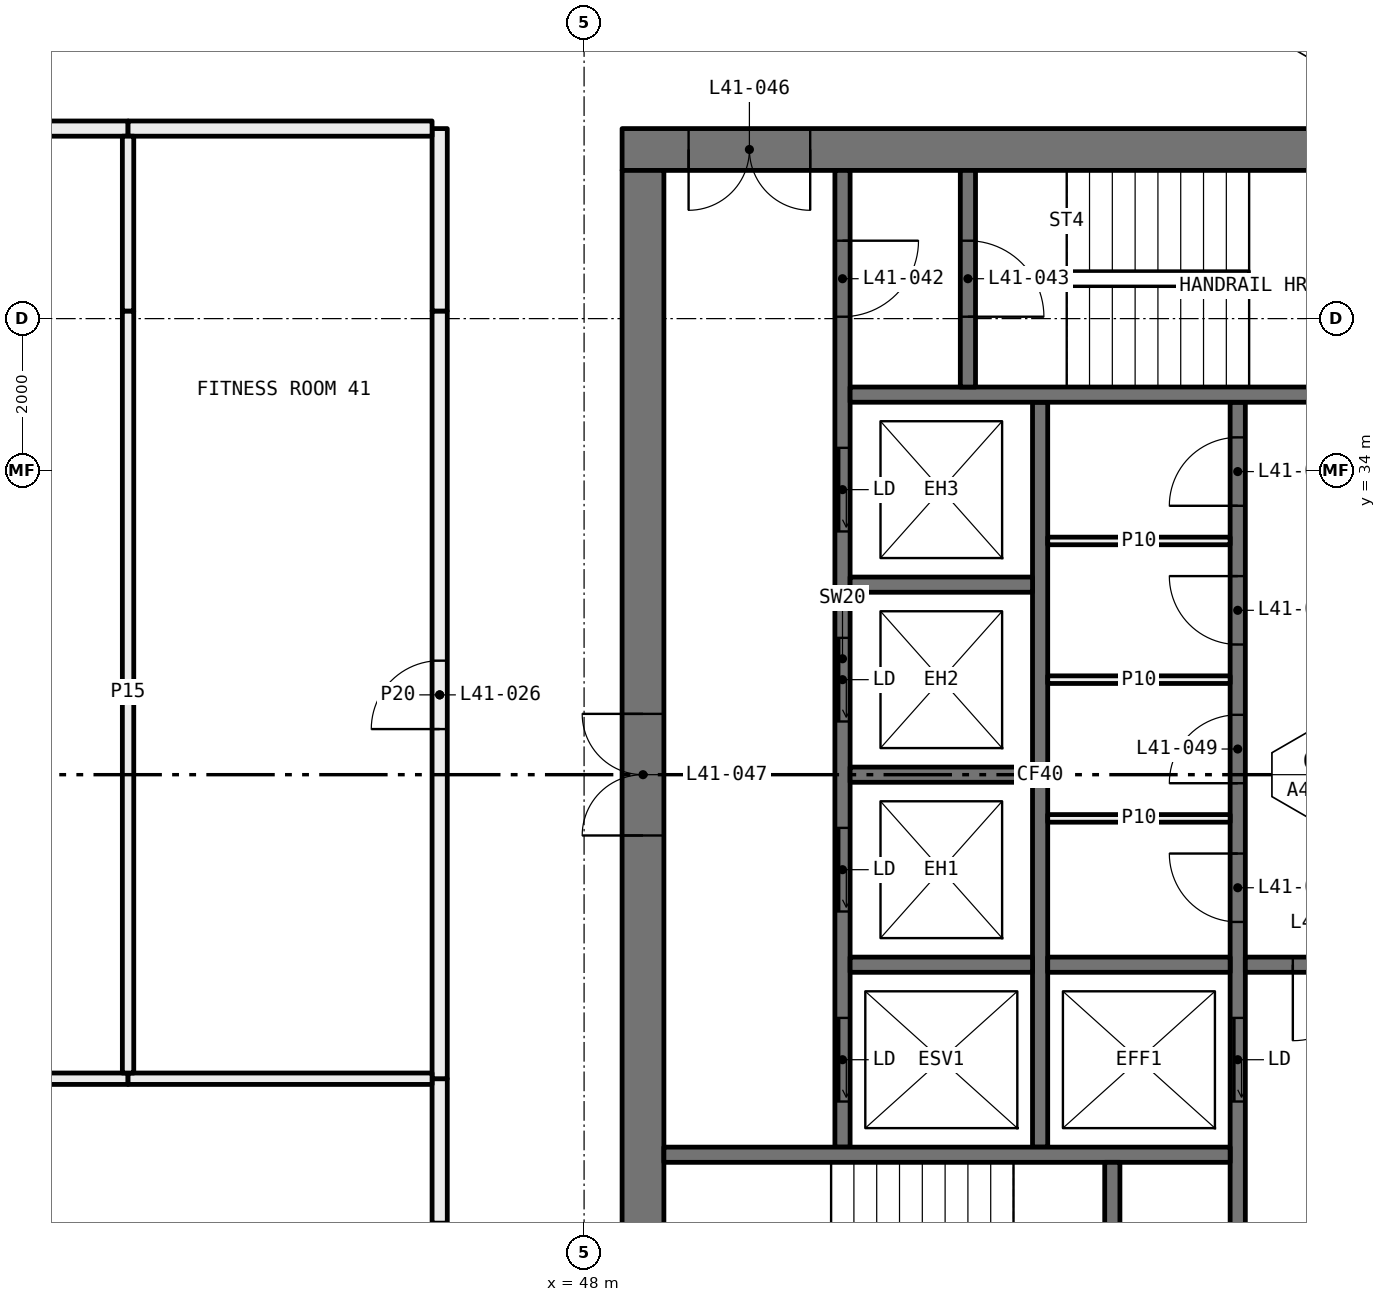
"""IFC4 building model, lengths in metres.
Left out: names, types, materials, properties, quantities, classifications, styles, units other than length and angle.
Written with IfcOpenShell. Run it as: python <this file> out.ifc"""

import sys

from ifc_helpers import new_model, si_unit, direction, frame, frame_2d, origin, place, context, subcontext, project, spatial, rectangle, extrude, element, fill, save


model = new_model("IFC4")
c1 = context("Model", 3, precision=1e-05, world=origin(), true_north=direction((0.0, 1.0)))
c2 = subcontext(c1, "Body", "Model", "MODEL_VIEW")
j1 = project(units=[si_unit("LENGTHUNIT", "METRE"), si_unit("PLANEANGLEUNIT", "RADIAN")], contexts=[c1])
p1 = place(None, origin())
s1 = spatial("IfcSite", under=j1, at=p1, CompositionType="ELEMENT")
p2 = place(p1, origin())
s2 = spatial("IfcBuilding", under=s1, at=p2, CompositionType="ELEMENT")
p3 = place(p2, frame((0.0, 0.0, 158.25)))
s3 = spatial("IfcBuildingStorey", under=s2, at=p3, CompositionType="ELEMENT", Elevation=158.25)
p4 = place(p3, frame((46.1, 24.1, 0.0), z_axis=(0.0, 0.0, 1.0), x_axis=(0.0, 1.0, 0.0)))
e1 = element("IfcWall", 1, at=p4, inside=s3, PredefinedType="PARTITIONING", context=c2, shape_type="SweptSolid", body=[
    extrude(rectangle(XDim=1.9, YDim=0.2, at=frame_2d((0.95, 0.0))), origin(), (0.0, 0.0, 1.0), 3.05),
])
p5 = place(p3, frame((42.0, 38.5, 0.0), z_axis=(0.0, 0.0, 1.0), x_axis=(-1.0, 0.0, 0.0)))
e2 = element("IfcWall", 2, at=p5, inside=s3, PredefinedType="PARTITIONING", context=c2, shape_type="SweptSolid", body=[
    extrude(rectangle(XDim=6.1, YDim=0.2, at=frame_2d((3.05, 0.0))), origin(), (0.0, 0.0, 1.0), 2.45),
])
p6 = place(p3, frame((46.1, 26.0, 0.0), z_axis=(0.0, 0.0, 1.0), x_axis=(0.0, 1.0, 0.0)))
e3 = element("IfcWall", 3, at=p6, inside=s3, PredefinedType="PARTITIONING", context=c2, shape_type="SweptSolid", body=[
    extrude(rectangle(XDim=10.1, YDim=0.2, at=frame_2d((5.05, 0.0))), origin(), (0.0, 0.0, 1.0), 2.45),
])
p7 = place(p6, frame((4.6, 0.0, 0.0)))
e4 = element("IfcOpeningElement", 4, at=p7, cuts=e3, PredefinedType="OPENING", context=c2, shape_type="SweptSolid", body=[
    extrude(rectangle(XDim=0.9, YDim=2.1, at=frame_2d((0.45, 1.05))), frame((0.0, 0.11, 0.0), z_axis=(0.0, -1.0, 0.0), x_axis=(1.0, 0.0, 0.0)), (0.0, 0.0, 1.0), 0.22),
])
p8 = place(p3, frame((46.1, 36.1, 0.0), z_axis=(0.0, 0.0, 1.0), x_axis=(0.0, 1.0, 0.0)))
e5 = element("IfcWall", 5, at=p8, inside=s3, PredefinedType="PARTITIONING", context=c2, shape_type="SweptSolid", body=[
    extrude(rectangle(XDim=2.4, YDim=0.2, at=frame_2d((1.2, 0.0))), origin(), (0.0, 0.0, 1.0), 3.05),
])
p9 = place(p3, frame((46.0, 38.5, 0.0), z_axis=(0.0, 0.0, 1.0), x_axis=(-1.0, 0.0, 0.0)))
e6 = element("IfcWall", 6, at=p9, inside=s3, PredefinedType="PARTITIONING", context=c2, shape_type="SweptSolid", body=[
    extrude(rectangle(XDim=4.0, YDim=0.2, at=frame_2d((2.0, 0.0))), origin(), (0.0, 0.0, 1.0), 3.05),
])
p10 = place(p3, frame((42.0, 26.0, 0.0), z_axis=(0.0, 0.0, 1.0), x_axis=(-1.0, 0.0, 0.0)))
e7 = element("IfcWall", 7, at=p10, inside=s3, PredefinedType="PARTITIONING", context=c2, shape_type="SweptSolid", body=[
    extrude(rectangle(XDim=5.925, YDim=0.15, at=frame_2d((2.962, 0.0))), origin(), (0.0, 0.0, 1.0), 2.45),
])
p11 = place(p3, frame((46.0, 26.0, 0.0), z_axis=(0.0, 0.0, 1.0), x_axis=(-1.0, 0.0, 0.0)))
e8 = element("IfcWall", 8, at=p11, inside=s3, PredefinedType="PARTITIONING", context=c2, shape_type="SweptSolid", body=[
    extrude(rectangle(XDim=4.0, YDim=0.15, at=frame_2d((2.0, 0.0))), origin(), (0.0, 0.0, 1.0), 3.05),
])
p12 = place(p3, frame((42.0, 26.075, 0.0), z_axis=(0.0, 0.0, 1.0), x_axis=(0.0, 1.0, 0.0)))
e9 = element("IfcWall", 9, at=p12, inside=s3, PredefinedType="PARTITIONING", context=c2, shape_type="SweptSolid", body=[
    extrude(rectangle(XDim=10.025, YDim=0.15, at=frame_2d((5.013, 0.0))), origin(), (0.0, 0.0, 1.0), 2.45),
])
p13 = place(p3, frame((42.0, 36.1, 0.0), z_axis=(0.0, 0.0, 1.0), x_axis=(0.0, 1.0, 0.0)))
e10 = element("IfcWall", 10, at=p13, inside=s3, PredefinedType="PARTITIONING", context=c2, shape_type="SweptSolid", body=[
    extrude(rectangle(XDim=2.3, YDim=0.15, at=frame_2d((1.15, 0.0))), origin(), (0.0, 0.0, 1.0), 3.05),
])
p14 = place(p3, frame((59.5, 38.225, 0.0), z_axis=(0.0, 0.0, 1.0), x_axis=(-1.0, 0.0, 0.0)))
e11 = element("IfcWall", 11, at=p14, inside=s3, PredefinedType="SHEAR", context=c2, shape_type="SweptSolid", body=[
    extrude(rectangle(XDim=11.0, YDim=0.55, at=frame_2d((5.5, 0.0))), origin(), (0.0, 0.0, 1.0), 3.05),
])
p15 = place(p14, frame((8.525, 0.0, 0.0)))
e12 = element("IfcOpeningElement", 12, at=p15, cuts=e11, PredefinedType="OPENING", context=c2, shape_type="SweptSolid", body=[
    extrude(rectangle(XDim=1.6, YDim=2.1, at=frame_2d((0.8, 1.05))), frame((0.0, 0.285, 0.0), z_axis=(0.0, -1.0, 0.0), x_axis=(1.0, 0.0, 0.0)), (0.0, 0.0, 1.0), 0.57),
])
p16 = place(p3, frame((48.775, 22.05, 0.0), z_axis=(0.0, 0.0, 1.0), x_axis=(0.0, 1.0, 0.0)))
e13 = element("IfcWall", 13, at=p16, inside=s3, PredefinedType="SHEAR", context=c2, shape_type="SweptSolid", body=[
    extrude(rectangle(XDim=15.9, YDim=0.55, at=frame_2d((7.95, 0.0))), origin(), (0.0, 0.0, 1.0), 3.05),
])
p17 = place(p16, frame((7.15, 0.0, 0.0)))
e14 = element("IfcOpeningElement", 14, at=p17, cuts=e13, PredefinedType="OPENING", context=c2, shape_type="SweptSolid", body=[
    extrude(rectangle(XDim=1.6, YDim=2.1, at=frame_2d((0.8, 1.05))), frame((0.0, 0.285, 0.0), z_axis=(0.0, -1.0, 0.0), x_axis=(1.0, 0.0, 0.0)), (0.0, 0.0, 1.0), 0.57),
])
p18 = place(p3, frame((56.6, 22.05, 0.0), z_axis=(0.0, 0.0, 1.0), x_axis=(0.0, 1.0, 0.0)))
e15 = element("IfcWall", 15, at=p18, inside=s3, PredefinedType="SOLIDWALL", context=c2, shape_type="SweptSolid", body=[
    extrude(rectangle(XDim=12.85, YDim=0.2, at=frame_2d((6.425, 0.0))), origin(), (0.0, 0.0, 1.0), 3.05),
])
p19 = place(p18, frame((3.65, 0.0, 0.0)))
e16 = element("IfcOpeningElement", 16, at=p19, cuts=e15, PredefinedType="OPENING", context=c2, shape_type="SweptSolid", body=[
    extrude(rectangle(XDim=1.1, YDim=2.1, at=frame_2d((0.55, 1.05))), frame((0.0, 0.11, 0.0), z_axis=(0.0, -1.0, 0.0), x_axis=(1.0, 0.0, 0.0)), (0.0, 0.0, 1.0), 0.22),
])
p20 = place(p18, frame((0.15, 0.0, 0.0)))
e17 = element("IfcOpeningElement", 17, at=p20, cuts=e15, PredefinedType="OPENING", context=c2, shape_type="SweptSolid", body=[
    extrude(rectangle(XDim=1.0, YDim=2.1, at=frame_2d((0.5, 1.05))), frame((0.0, 0.11, 0.0), z_axis=(0.0, -1.0, 0.0), x_axis=(1.0, 0.0, 0.0)), (0.0, 0.0, 1.0), 0.22),
])
p21 = place(p18, frame((6.012, 0.0, 0.0)))
e18 = element("IfcOpeningElement", 18, at=p21, cuts=e15, PredefinedType="OPENING", context=c2, shape_type="SweptSolid", body=[
    extrude(rectangle(XDim=0.9, YDim=2.1, at=frame_2d((0.45, 1.05))), frame((0.0, 0.11, 0.0), z_axis=(0.0, -1.0, 0.0), x_axis=(1.0, 0.0, 0.0)), (0.0, 0.0, 1.0), 0.22),
])
p22 = place(p18, frame((7.837, 0.0, 0.0)))
e19 = element("IfcOpeningElement", 19, at=p22, cuts=e15, PredefinedType="OPENING", context=c2, shape_type="SweptSolid", body=[
    extrude(rectangle(XDim=0.9, YDim=2.1, at=frame_2d((0.45, 1.05))), frame((0.0, 0.11, 0.0), z_axis=(0.0, -1.0, 0.0), x_axis=(1.0, 0.0, 0.0)), (0.0, 0.0, 1.0), 0.22),
])
p23 = place(p18, frame((9.663, 0.0, 0.0)))
e20 = element("IfcOpeningElement", 20, at=p23, cuts=e15, PredefinedType="OPENING", context=c2, shape_type="SweptSolid", body=[
    extrude(rectangle(XDim=0.9, YDim=2.1, at=frame_2d((0.45, 1.05))), frame((0.0, 0.11, 0.0), z_axis=(0.0, -1.0, 0.0), x_axis=(1.0, 0.0, 0.0)), (0.0, 0.0, 1.0), 0.22),
])
p24 = place(p18, frame((11.488, 0.0, 0.0)))
e21 = element("IfcOpeningElement", 21, at=p24, cuts=e15, PredefinedType="OPENING", context=c2, shape_type="SweptSolid", body=[
    extrude(rectangle(XDim=0.9, YDim=2.1, at=frame_2d((0.45, 1.05))), frame((0.0, 0.11, 0.0), z_axis=(0.0, -1.0, 0.0), x_axis=(1.0, 0.0, 0.0)), (0.0, 0.0, 1.0), 0.22),
])
p25 = place(p3, frame((51.4, 25.1, 0.0), z_axis=(0.0, 0.0, 1.0), x_axis=(0.0, 1.0, 0.0)))
e22 = element("IfcWall", 22, at=p25, inside=s3, PredefinedType="SOLIDWALL", context=c2, shape_type="SweptSolid", body=[
    extrude(rectangle(XDim=12.85, YDim=0.2, at=frame_2d((6.425, 0.0))), origin(), (0.0, 0.0, 1.0), 3.05),
])
p26 = place(p25, frame((0.6, 0.0, 0.0)))
e23 = element("IfcOpeningElement", 23, at=p26, cuts=e22, PredefinedType="OPENING", context=c2, shape_type="SweptSolid", body=[
    extrude(rectangle(XDim=1.1, YDim=2.1, at=frame_2d((0.55, 1.05))), frame((0.0, 0.11, 0.0), z_axis=(0.0, -1.0, 0.0), x_axis=(1.0, 0.0, 0.0)), (0.0, 0.0, 1.0), 0.22),
])
p27 = place(p25, frame((3.1, 0.0, 0.0)))
e24 = element("IfcOpeningElement", 24, at=p27, cuts=e22, PredefinedType="OPENING", context=c2, shape_type="SweptSolid", body=[
    extrude(rectangle(XDim=1.1, YDim=2.1, at=frame_2d((0.55, 1.05))), frame((0.0, 0.11, 0.0), z_axis=(0.0, -1.0, 0.0), x_axis=(1.0, 0.0, 0.0)), (0.0, 0.0, 1.0), 0.22),
])
p28 = place(p25, frame((5.6, 0.0, 0.0)))
e25 = element("IfcOpeningElement", 25, at=p28, cuts=e22, PredefinedType="OPENING", context=c2, shape_type="SweptSolid", body=[
    extrude(rectangle(XDim=1.1, YDim=2.1, at=frame_2d((0.55, 1.05))), frame((0.0, 0.11, 0.0), z_axis=(0.0, -1.0, 0.0), x_axis=(1.0, 0.0, 0.0)), (0.0, 0.0, 1.0), 0.22),
])
p29 = place(p25, frame((8.1, 0.0, 0.0)))
e26 = element("IfcOpeningElement", 26, at=p29, cuts=e22, PredefinedType="OPENING", context=c2, shape_type="SweptSolid", body=[
    extrude(rectangle(XDim=1.1, YDim=2.1, at=frame_2d((0.55, 1.05))), frame((0.0, 0.11, 0.0), z_axis=(0.0, -1.0, 0.0), x_axis=(1.0, 0.0, 0.0)), (0.0, 0.0, 1.0), 0.22),
])
p30 = place(p25, frame((10.925, 0.0, 0.0)))
e27 = element("IfcOpeningElement", 27, at=p30, cuts=e22, PredefinedType="OPENING", context=c2, shape_type="SweptSolid", body=[
    extrude(rectangle(XDim=1.0, YDim=2.1, at=frame_2d((0.5, 1.05))), frame((0.0, 0.11, 0.0), z_axis=(0.0, -1.0, 0.0), x_axis=(1.0, 0.0, 0.0)), (0.0, 0.0, 1.0), 0.22),
])
p31 = place(p3, frame((54.0, 25.1, 0.0), z_axis=(0.0, 0.0, 1.0), x_axis=(0.0, 1.0, 0.0)))
e28 = element("IfcWall", 28, at=p31, inside=s3, PredefinedType="SOLIDWALL", context=c2, shape_type="SweptSolid", body=[
    extrude(rectangle(XDim=9.8, YDim=0.2, at=frame_2d((4.9, 0.0))), origin(), (0.0, 0.0, 1.0), 3.05),
])
for number, where, z_axis, x_axis in (
    (29, (56.5, 25.0, 0.0), (0.0, 0.0, 1.0), (-1.0, 0.0, 0.0)),
    (30, (58.95, 35.0, 0.0), (0.0, 0.0, 1.0), (-1.0, 0.0, 0.0)),
):
    element("IfcWall", number, at=place(p3, frame(where, z_axis=z_axis, x_axis=x_axis)), inside=s3, PredefinedType="SOLIDWALL", context=c2, shape_type="SweptSolid", body=[
        extrude(rectangle(XDim=7.45, YDim=0.2, at=frame_2d((3.725, 0.0))), origin(), (0.0, 0.0, 1.0), 3.05),
    ])
p32 = place(p3, frame((58.95, 27.5, 0.0), z_axis=(0.0, 0.0, 1.0), x_axis=(-1.0, 0.0, 0.0)))
e31 = element("IfcWall", 31, at=p32, inside=s3, PredefinedType="SOLIDWALL", context=c2, shape_type="SweptSolid", body=[
    extrude(rectangle(XDim=2.25, YDim=0.2, at=frame_2d((1.125, 0.0))), origin(), (0.0, 0.0, 1.0), 3.05),
])
p33 = place(p32, frame((0.625, 0.0, 0.0)))
e32 = element("IfcOpeningElement", 32, at=p33, cuts=e31, PredefinedType="OPENING", context=c2, shape_type="SweptSolid", body=[
    extrude(rectangle(XDim=1.0, YDim=2.1, at=frame_2d((0.5, 1.05))), frame((0.0, 0.11, 0.0), z_axis=(0.0, -1.0, 0.0), x_axis=(1.0, 0.0, 0.0)), (0.0, 0.0, 1.0), 0.22),
])
p34 = place(p3, frame((54.95, 22.05, 0.0), z_axis=(0.0, 0.0, 1.0), x_axis=(0.0, 1.0, 0.0)))
e33 = element("IfcWall", 33, at=p34, inside=s3, PredefinedType="SOLIDWALL", context=c2, shape_type="SweptSolid", body=[
    extrude(rectangle(XDim=2.85, YDim=0.2, at=frame_2d((1.425, 0.0))), origin(), (0.0, 0.0, 1.0), 3.05),
])
p35 = place(p34, frame((0.15, 0.0, 0.0)))
e34 = element("IfcOpeningElement", 34, at=p35, cuts=e33, PredefinedType="OPENING", context=c2, shape_type="SweptSolid", body=[
    extrude(rectangle(XDim=1.0, YDim=2.1, at=frame_2d((0.5, 1.05))), frame((0.0, 0.11, 0.0), z_axis=(0.0, -1.0, 0.0), x_axis=(1.0, 0.0, 0.0)), (0.0, 0.0, 1.0), 0.22),
])
p36 = place(p3, frame((53.05, 35.1, 0.0), z_axis=(0.0, 0.0, 1.0), x_axis=(0.0, 1.0, 0.0)))
e35 = element("IfcWall", 35, at=p36, inside=s3, PredefinedType="SOLIDWALL", context=c2, shape_type="SweptSolid", body=[
    extrude(rectangle(XDim=2.85, YDim=0.2, at=frame_2d((1.425, 0.0))), origin(), (0.0, 0.0, 1.0), 3.05),
])
p37 = place(p36, frame((0.925, 0.0, 0.0)))
e36 = element("IfcOpeningElement", 36, at=p37, cuts=e35, PredefinedType="OPENING", context=c2, shape_type="SweptSolid", body=[
    extrude(rectangle(XDim=1.0, YDim=2.1, at=frame_2d((0.5, 1.05))), frame((0.0, 0.11, 0.0), z_axis=(0.0, -1.0, 0.0), x_axis=(1.0, 0.0, 0.0)), (0.0, 0.0, 1.0), 0.22),
])
for number, where, z_axis, x_axis in (
    (37, (56.5, 27.5, 0.0), (0.0, 0.0, 1.0), (-1.0, 0.0, 0.0)),
    (38, (53.9, 27.5, 0.0), (0.0, 0.0, 1.0), (-1.0, 0.0, 0.0)),
    (39, (53.9, 30.0, 0.0), (0.0, 0.0, 1.0), (-1.0, 0.0, 0.0)),
    (40, (53.9, 32.5, 0.0), (0.0, 0.0, 1.0), (-1.0, 0.0, 0.0)),
):
    element("IfcWall", number, at=place(p3, frame(where, z_axis=z_axis, x_axis=x_axis)), inside=s3, PredefinedType="SOLIDWALL", context=c2, shape_type="SweptSolid", body=[
        extrude(rectangle(XDim=2.4, YDim=0.2, at=frame_2d((1.2, 0.0))), origin(), (0.0, 0.0, 1.0), 3.05),
    ])
for number, where, z_axis, x_axis in (
    (41, (56.5, 29.425, 0.0), (0.0, 0.0, 1.0), (-1.0, 0.0, 0.0)),
    (42, (56.5, 31.25, 0.0), (0.0, 0.0, 1.0), (-1.0, 0.0, 0.0)),
    (43, (56.5, 33.075, 0.0), (0.0, 0.0, 1.0), (-1.0, 0.0, 0.0)),
):
    element("IfcWall", number, at=place(p3, frame(where, z_axis=z_axis, x_axis=x_axis)), inside=s3, PredefinedType="PARTITIONING", context=c2, shape_type="SweptSolid", body=[
        extrude(rectangle(XDim=2.4, YDim=0.1, at=frame_2d((1.2, 0.0))), origin(), (0.0, 0.0, 1.0), 3.05),
    ])
p38 = place(p7, origin())
e44 = element("IfcDoor", 44, at=p38, inside=s3, OperationType="SINGLE_SWING_RIGHT", PredefinedType="DOOR", context=c2, shape_type="SweptSolid", body=[
    extrude(rectangle(XDim=0.9, YDim=2.1, at=frame_2d((0.45, 1.05))), frame((0.0, 0.025, 0.0), z_axis=(0.0, -1.0, 0.0), x_axis=(1.0, 0.0, 0.0)), (0.0, 0.0, 1.0), 0.05),
])
fill(e4, e44)
p39 = place(p26, origin())
e45 = element("IfcDoor", 45, at=p39, inside=s3, OperationType="SLIDING_TO_LEFT", PredefinedType="DOOR", context=c2, shape_type="SweptSolid", body=[
    extrude(rectangle(XDim=1.1, YDim=2.1, at=frame_2d((0.55, 1.05))), frame((0.0, 0.025, 0.0), z_axis=(0.0, -1.0, 0.0), x_axis=(1.0, 0.0, 0.0)), (0.0, 0.0, 1.0), 0.05),
])
fill(e23, e45)
p40 = place(p27, origin())
e46 = element("IfcDoor", 46, at=p40, inside=s3, OperationType="SLIDING_TO_LEFT", PredefinedType="DOOR", context=c2, shape_type="SweptSolid", body=[
    extrude(rectangle(XDim=1.1, YDim=2.1, at=frame_2d((0.55, 1.05))), frame((0.0, 0.025, 0.0), z_axis=(0.0, -1.0, 0.0), x_axis=(1.0, 0.0, 0.0)), (0.0, 0.0, 1.0), 0.05),
])
fill(e24, e46)
p41 = place(p28, origin())
e47 = element("IfcDoor", 47, at=p41, inside=s3, OperationType="SLIDING_TO_LEFT", PredefinedType="DOOR", context=c2, shape_type="SweptSolid", body=[
    extrude(rectangle(XDim=1.1, YDim=2.1, at=frame_2d((0.55, 1.05))), frame((0.0, 0.025, 0.0), z_axis=(0.0, -1.0, 0.0), x_axis=(1.0, 0.0, 0.0)), (0.0, 0.0, 1.0), 0.05),
])
fill(e25, e47)
p42 = place(p29, origin())
e48 = element("IfcDoor", 48, at=p42, inside=s3, OperationType="SLIDING_TO_LEFT", PredefinedType="DOOR", context=c2, shape_type="SweptSolid", body=[
    extrude(rectangle(XDim=1.1, YDim=2.1, at=frame_2d((0.55, 1.05))), frame((0.0, 0.025, 0.0), z_axis=(0.0, -1.0, 0.0), x_axis=(1.0, 0.0, 0.0)), (0.0, 0.0, 1.0), 0.05),
])
fill(e26, e48)
p43 = place(p19, origin())
e49 = element("IfcDoor", 49, at=p43, inside=s3, OperationType="SLIDING_TO_LEFT", PredefinedType="DOOR", context=c2, shape_type="SweptSolid", body=[
    extrude(rectangle(XDim=1.1, YDim=2.1, at=frame_2d((0.55, 1.05))), frame((0.0, 0.025, 0.0), z_axis=(0.0, -1.0, 0.0), x_axis=(1.0, 0.0, 0.0)), (0.0, 0.0, 1.0), 0.05),
])
fill(e16, e49)
p44 = place(p30, frame((1.0, 0.0, 0.0), x_axis=(-1.0, 0.0, 0.0)))
e50 = element("IfcDoor", 50, at=p44, inside=s3, OperationType="SINGLE_SWING_RIGHT", PredefinedType="DOOR", context=c2, shape_type="SweptSolid", body=[
    extrude(rectangle(XDim=1.0, YDim=2.1, at=frame_2d((0.5, 1.05))), frame((0.0, 0.025, 0.0), z_axis=(0.0, -1.0, 0.0), x_axis=(1.0, 0.0, 0.0)), (0.0, 0.0, 1.0), 0.05),
])
fill(e27, e50)
p45 = place(p37, frame((1.0, 0.0, 0.0), x_axis=(-1.0, 0.0, 0.0)))
e51 = element("IfcDoor", 51, at=p45, inside=s3, OperationType="SINGLE_SWING_LEFT", PredefinedType="DOOR", context=c2, shape_type="SweptSolid", body=[
    extrude(rectangle(XDim=1.0, YDim=2.1, at=frame_2d((0.5, 1.05))), frame((0.0, 0.025, 0.0), z_axis=(0.0, -1.0, 0.0), x_axis=(1.0, 0.0, 0.0)), (0.0, 0.0, 1.0), 0.05),
])
fill(e36, e51)
p46 = place(p33, origin())
e52 = element("IfcDoor", 52, at=p46, inside=s3, OperationType="SINGLE_SWING_LEFT", PredefinedType="DOOR", context=c2, shape_type="SweptSolid", body=[
    extrude(rectangle(XDim=1.0, YDim=2.1, at=frame_2d((0.5, 1.05))), frame((0.0, 0.025, 0.0), z_axis=(0.0, -1.0, 0.0), x_axis=(1.0, 0.0, 0.0)), (0.0, 0.0, 1.0), 0.05),
])
fill(e32, e52)
p47 = place(p15, origin())
e53 = element("IfcDoor", 53, at=p47, inside=s3, OperationType="DOUBLE_DOOR_SINGLE_SWING", PredefinedType="DOOR", context=c2, shape_type="SweptSolid", body=[
    extrude(rectangle(XDim=1.6, YDim=2.1, at=frame_2d((0.8, 1.05))), frame((0.0, 0.025, 0.0), z_axis=(0.0, -1.0, 0.0), x_axis=(1.0, 0.0, 0.0)), (0.0, 0.0, 1.0), 0.05),
])
fill(e12, e53)
p48 = place(p17, origin())
e54 = element("IfcDoor", 54, at=p48, inside=s3, OperationType="DOUBLE_DOOR_SINGLE_SWING", PredefinedType="DOOR", context=c2, shape_type="SweptSolid", body=[
    extrude(rectangle(XDim=1.6, YDim=2.1, at=frame_2d((0.8, 1.05))), frame((0.0, 0.025, 0.0), z_axis=(0.0, -1.0, 0.0), x_axis=(1.0, 0.0, 0.0)), (0.0, 0.0, 1.0), 0.05),
])
fill(e14, e54)
p49 = place(p21, origin())
e55 = element("IfcDoor", 55, at=p49, inside=s3, OperationType="SINGLE_SWING_LEFT", PredefinedType="DOOR", context=c2, shape_type="SweptSolid", body=[
    extrude(rectangle(XDim=0.9, YDim=2.1, at=frame_2d((0.45, 1.05))), frame((0.0, 0.025, 0.0), z_axis=(0.0, -1.0, 0.0), x_axis=(1.0, 0.0, 0.0)), (0.0, 0.0, 1.0), 0.05),
])
fill(e18, e55)
p50 = place(p22, origin())
e56 = element("IfcDoor", 56, at=p50, inside=s3, OperationType="SINGLE_SWING_RIGHT", PredefinedType="DOOR", context=c2, shape_type="SweptSolid", body=[
    extrude(rectangle(XDim=0.9, YDim=2.1, at=frame_2d((0.45, 1.05))), frame((0.0, 0.025, 0.0), z_axis=(0.0, -1.0, 0.0), x_axis=(1.0, 0.0, 0.0)), (0.0, 0.0, 1.0), 0.05),
])
fill(e19, e56)
p51 = place(p23, origin())
e57 = element("IfcDoor", 57, at=p51, inside=s3, OperationType="SINGLE_SWING_LEFT", PredefinedType="DOOR", context=c2, shape_type="SweptSolid", body=[
    extrude(rectangle(XDim=0.9, YDim=2.1, at=frame_2d((0.45, 1.05))), frame((0.0, 0.025, 0.0), z_axis=(0.0, -1.0, 0.0), x_axis=(1.0, 0.0, 0.0)), (0.0, 0.0, 1.0), 0.05),
])
fill(e20, e57)
p52 = place(p24, origin())
e58 = element("IfcDoor", 58, at=p52, inside=s3, OperationType="SINGLE_SWING_RIGHT", PredefinedType="DOOR", context=c2, shape_type="SweptSolid", body=[
    extrude(rectangle(XDim=0.9, YDim=2.1, at=frame_2d((0.45, 1.05))), frame((0.0, 0.025, 0.0), z_axis=(0.0, -1.0, 0.0), x_axis=(1.0, 0.0, 0.0)), (0.0, 0.0, 1.0), 0.05),
])
fill(e21, e58)
save(model, sys.argv[1])
